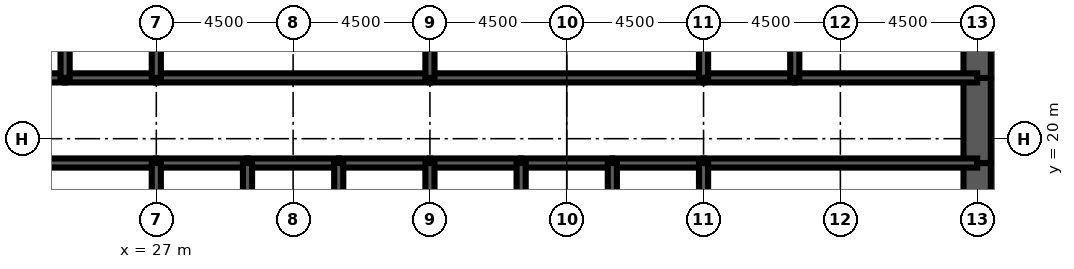
"""IFC4 building model, lengths in metres.
Left out: names, types, materials, properties, quantities, classifications, styles, units other than length and angle.
Written with IfcOpenShell. Run it as: python <this file> out.ifc"""

import sys

from ifc_helpers import new_model, si_unit, direction, frame, frame_2d, origin, place, context, subcontext, project, spatial, rectangle, extrude, element, fill, save


model = new_model("IFC4")
c1 = context("Model", 3, precision=1e-05, world=origin(), true_north=direction((0.0, 1.0)))
c2 = subcontext(c1, "Body", "Model", "MODEL_VIEW")
j1 = project(units=[si_unit("LENGTHUNIT", "METRE"), si_unit("PLANEANGLEUNIT", "RADIAN")], contexts=[c1])
p1 = place(None, origin())
s1 = spatial("IfcSite", under=j1, at=p1, CompositionType="ELEMENT")
p2 = place(p1, origin())
s2 = spatial("IfcBuilding", under=s1, at=p2, CompositionType="ELEMENT")
p3 = place(p2, frame((0.0, 0.0, 167.7)))
s3 = spatial("IfcBuildingStorey", under=s2, at=p3, CompositionType="ELEMENT", Elevation=167.7)
p4 = place(p3, frame((54.0, 16.0, 0.0), z_axis=(0.0, 0.0, 1.0), x_axis=(0.0, 1.0, 0.0)))
e1 = element("IfcWall", 1, at=p4, inside=s3, PredefinedType="SHEAR", context=c2, shape_type="SweptSolid", body=[
    extrude(rectangle(XDim=3.2, YDim=0.9, at=frame_2d((1.6, 0.0))), origin(), (0.0, 0.0, 1.0), 4.2),
])
p5 = place(p3, frame((54.0, 19.2, 0.0), z_axis=(0.0, 0.0, 1.0), x_axis=(0.0, 1.0, 0.0)))
e2 = element("IfcWall", 2, at=p5, inside=s3, PredefinedType="SHEAR", context=c2, shape_type="SweptSolid", body=[
    extrude(rectangle(XDim=2.8, YDim=0.9, at=frame_2d((1.4, 0.0))), origin(), (0.0, 0.0, 1.0), 4.2),
])
p6 = place(p5, frame((0.4, 0.0, 0.0)))
e3 = element("IfcOpeningElement", 3, at=p6, cuts=e2, PredefinedType="OPENING", context=c2, shape_type="SweptSolid", body=[
    extrude(rectangle(XDim=1.8, YDim=2.1, at=frame_2d((0.9, 1.05))), frame((0.0, 0.46, 0.0), z_axis=(0.0, -1.0, 0.0), x_axis=(1.0, 0.0, 0.0)), (0.0, 0.0, 1.0), 0.92),
])
p7 = place(p3, frame((54.0, 22.0, 0.0), z_axis=(0.0, 0.0, 1.0), x_axis=(0.0, 1.0, 0.0)))
e4 = element("IfcWall", 4, at=p7, inside=s3, PredefinedType="SHEAR", context=c2, shape_type="SweptSolid", body=[
    extrude(rectangle(XDim=4.0, YDim=0.9, at=frame_2d((2.0, 0.0))), origin(), (0.0, 0.0, 1.0), 4.2),
])
p8 = place(p3, frame((18.0, 19.2, 0.0), z_axis=(0.0, 0.0, 1.0), x_axis=(1.0, 0.0, 0.0)))
e5 = element("IfcWall", 5, at=p8, inside=s3, PredefinedType="SOLIDWALL", context=c2, shape_type="SweptSolid", body=[
    extrude(rectangle(XDim=9.0, YDim=0.3, at=frame_2d((4.5, 0.0))), origin(), (0.0, 0.0, 1.0), 4.2),
])
p9 = place(p8, frame((0.65, 0.0, 0.0)))
e6 = element("IfcOpeningElement", 6, at=p9, cuts=e5, PredefinedType="OPENING", context=c2, shape_type="SweptSolid", body=[
    extrude(rectangle(XDim=1.0, YDim=2.1, at=frame_2d((0.5, 1.05))), frame((0.0, 0.16, 0.0), z_axis=(0.0, -1.0, 0.0), x_axis=(1.0, 0.0, 0.0)), (0.0, 0.0, 1.0), 0.32),
])
p10 = place(p3, frame((27.0, 19.2, 0.0), z_axis=(0.0, 0.0, 1.0), x_axis=(1.0, 0.0, 0.0)))
e7 = element("IfcWall", 7, at=p10, inside=s3, PredefinedType="SOLIDWALL", context=c2, shape_type="SweptSolid", body=[
    extrude(rectangle(XDim=3.0, YDim=0.3, at=frame_2d((1.5, 0.0))), origin(), (0.0, 0.0, 1.0), 4.2),
])
p11 = place(p10, frame((0.95, 0.0, 0.0)))
e8 = element("IfcOpeningElement", 8, at=p11, cuts=e7, PredefinedType="OPENING", context=c2, shape_type="SweptSolid", body=[
    extrude(rectangle(XDim=1.1, YDim=2.2, at=frame_2d((0.55, 1.1))), frame((0.0, 0.16, 0.0), z_axis=(0.0, -1.0, 0.0), x_axis=(1.0, 0.0, 0.0)), (0.0, 0.0, 1.0), 0.32),
])
p12 = place(p3, frame((30.0, 19.2, 0.0), z_axis=(0.0, 0.0, 1.0), x_axis=(1.0, 0.0, 0.0)))
e9 = element("IfcWall", 9, at=p12, inside=s3, PredefinedType="SOLIDWALL", context=c2, shape_type="SweptSolid", body=[
    extrude(rectangle(XDim=3.0, YDim=0.3, at=frame_2d((1.5, 0.0))), origin(), (0.0, 0.0, 1.0), 4.2),
])
p13 = place(p12, frame((0.95, 0.0, 0.0)))
e10 = element("IfcOpeningElement", 10, at=p13, cuts=e9, PredefinedType="OPENING", context=c2, shape_type="SweptSolid", body=[
    extrude(rectangle(XDim=1.1, YDim=2.2, at=frame_2d((0.55, 1.1))), frame((0.0, 0.16, 0.0), z_axis=(0.0, -1.0, 0.0), x_axis=(1.0, 0.0, 0.0)), (0.0, 0.0, 1.0), 0.32),
])
p14 = place(p3, frame((33.0, 19.2, 0.0), z_axis=(0.0, 0.0, 1.0), x_axis=(1.0, 0.0, 0.0)))
e11 = element("IfcWall", 11, at=p14, inside=s3, PredefinedType="SOLIDWALL", context=c2, shape_type="SweptSolid", body=[
    extrude(rectangle(XDim=3.0, YDim=0.3, at=frame_2d((1.5, 0.0))), origin(), (0.0, 0.0, 1.0), 4.2),
])
p15 = place(p14, frame((0.95, 0.0, 0.0)))
e12 = element("IfcOpeningElement", 12, at=p15, cuts=e11, PredefinedType="OPENING", context=c2, shape_type="SweptSolid", body=[
    extrude(rectangle(XDim=1.1, YDim=2.2, at=frame_2d((0.55, 1.1))), frame((0.0, 0.16, 0.0), z_axis=(0.0, -1.0, 0.0), x_axis=(1.0, 0.0, 0.0)), (0.0, 0.0, 1.0), 0.32),
])
p16 = place(p3, frame((36.0, 19.2, 0.0), z_axis=(0.0, 0.0, 1.0), x_axis=(1.0, 0.0, 0.0)))
e13 = element("IfcWall", 13, at=p16, inside=s3, PredefinedType="SOLIDWALL", context=c2, shape_type="SweptSolid", body=[
    extrude(rectangle(XDim=3.0, YDim=0.3, at=frame_2d((1.5, 0.0))), origin(), (0.0, 0.0, 1.0), 4.2),
])
p17 = place(p16, frame((0.95, 0.0, 0.0)))
e14 = element("IfcOpeningElement", 14, at=p17, cuts=e13, PredefinedType="OPENING", context=c2, shape_type="SweptSolid", body=[
    extrude(rectangle(XDim=1.1, YDim=2.2, at=frame_2d((0.55, 1.1))), frame((0.0, 0.16, 0.0), z_axis=(0.0, -1.0, 0.0), x_axis=(1.0, 0.0, 0.0)), (0.0, 0.0, 1.0), 0.32),
])
p18 = place(p3, frame((39.0, 19.2, 0.0), z_axis=(0.0, 0.0, 1.0), x_axis=(1.0, 0.0, 0.0)))
e15 = element("IfcWall", 15, at=p18, inside=s3, PredefinedType="SOLIDWALL", context=c2, shape_type="SweptSolid", body=[
    extrude(rectangle(XDim=3.0, YDim=0.3, at=frame_2d((1.5, 0.0))), origin(), (0.0, 0.0, 1.0), 4.2),
])
p19 = place(p18, frame((1.0, 0.0, 0.0)))
e16 = element("IfcOpeningElement", 16, at=p19, cuts=e15, PredefinedType="OPENING", context=c2, shape_type="SweptSolid", body=[
    extrude(rectangle(XDim=1.0, YDim=2.1, at=frame_2d((0.5, 1.05))), frame((0.0, 0.16, 0.0), z_axis=(0.0, -1.0, 0.0), x_axis=(1.0, 0.0, 0.0)), (0.0, 0.0, 1.0), 0.32),
])
p20 = place(p3, frame((42.0, 19.2, 0.0), z_axis=(0.0, 0.0, 1.0), x_axis=(1.0, 0.0, 0.0)))
e17 = element("IfcWall", 17, at=p20, inside=s3, PredefinedType="SOLIDWALL", context=c2, shape_type="SweptSolid", body=[
    extrude(rectangle(XDim=3.0, YDim=0.3, at=frame_2d((1.5, 0.0))), origin(), (0.0, 0.0, 1.0), 4.2),
])
p21 = place(p3, frame((45.0, 19.2, 0.0), z_axis=(0.0, 0.0, 1.0), x_axis=(1.0, 0.0, 0.0)))
e18 = element("IfcWall", 18, at=p21, inside=s3, PredefinedType="SOLIDWALL", context=c2, shape_type="SweptSolid", body=[
    extrude(rectangle(XDim=9.0, YDim=0.3, at=frame_2d((4.5, 0.0))), origin(), (0.0, 0.0, 1.0), 4.2),
])
p22 = place(p21, frame((7.35, 0.0, 0.0)))
e19 = element("IfcOpeningElement", 19, at=p22, cuts=e18, PredefinedType="OPENING", context=c2, shape_type="SweptSolid", body=[
    extrude(rectangle(XDim=1.0, YDim=2.1, at=frame_2d((0.5, 1.05))), frame((0.0, 0.16, 0.0), z_axis=(0.0, -1.0, 0.0), x_axis=(1.0, 0.0, 0.0)), (0.0, 0.0, 1.0), 0.32),
])
p23 = place(p3, frame((18.0, 22.0, 0.0), z_axis=(0.0, 0.0, 1.0), x_axis=(1.0, 0.0, 0.0)))
e20 = element("IfcWall", 20, at=p23, inside=s3, PredefinedType="SOLIDWALL", context=c2, shape_type="SweptSolid", body=[
    extrude(rectangle(XDim=6.0, YDim=0.3, at=frame_2d((3.0, 0.0))), origin(), (0.0, 0.0, 1.0), 4.2),
])
p24 = place(p23, frame((4.4, 0.0, 0.0)))
e21 = element("IfcOpeningElement", 21, at=p24, cuts=e20, PredefinedType="OPENING", context=c2, shape_type="SweptSolid", body=[
    extrude(rectangle(XDim=1.0, YDim=2.1, at=frame_2d((0.5, 1.05))), frame((0.0, 0.16, 0.0), z_axis=(0.0, -1.0, 0.0), x_axis=(1.0, 0.0, 0.0)), (0.0, 0.0, 1.0), 0.32),
])
p25 = place(p23, frame((1.0, 0.0, 0.0)))
e22 = element("IfcOpeningElement", 22, at=p25, cuts=e20, PredefinedType="OPENING", context=c2, shape_type="SweptSolid", body=[
    extrude(rectangle(XDim=1.0, YDim=2.1, at=frame_2d((0.5, 1.05))), frame((0.0, 0.16, 0.0), z_axis=(0.0, -1.0, 0.0), x_axis=(1.0, 0.0, 0.0)), (0.0, 0.0, 1.0), 0.32),
])
p26 = place(p3, frame((24.0, 22.0, 0.0), z_axis=(0.0, 0.0, 1.0), x_axis=(1.0, 0.0, 0.0)))
e23 = element("IfcWall", 23, at=p26, inside=s3, PredefinedType="SOLIDWALL", context=c2, shape_type="SweptSolid", body=[
    extrude(rectangle(XDim=3.0, YDim=0.3, at=frame_2d((1.5, 0.0))), origin(), (0.0, 0.0, 1.0), 4.2),
])
p27 = place(p26, frame((1.0, 0.0, 0.0)))
e24 = element("IfcOpeningElement", 24, at=p27, cuts=e23, PredefinedType="OPENING", context=c2, shape_type="SweptSolid", body=[
    extrude(rectangle(XDim=1.0, YDim=2.1, at=frame_2d((0.5, 1.05))), frame((0.0, 0.16, 0.0), z_axis=(0.0, -1.0, 0.0), x_axis=(1.0, 0.0, 0.0)), (0.0, 0.0, 1.0), 0.32),
])
p28 = place(p3, frame((27.0, 22.0, 0.0), z_axis=(0.0, 0.0, 1.0), x_axis=(1.0, 0.0, 0.0)))
e25 = element("IfcWall", 25, at=p28, inside=s3, PredefinedType="SOLIDWALL", context=c2, shape_type="SweptSolid", body=[
    extrude(rectangle(XDim=9.0, YDim=0.3, at=frame_2d((4.5, 0.0))), origin(), (0.0, 0.0, 1.0), 4.2),
])
p29 = place(p28, frame((4.0, 0.0, 0.0)))
e26 = element("IfcOpeningElement", 26, at=p29, cuts=e25, PredefinedType="OPENING", context=c2, shape_type="SweptSolid", body=[
    extrude(rectangle(XDim=1.0, YDim=2.1, at=frame_2d((0.5, 1.05))), frame((0.0, 0.16, 0.0), z_axis=(0.0, -1.0, 0.0), x_axis=(1.0, 0.0, 0.0)), (0.0, 0.0, 1.0), 0.32),
])
p30 = place(p3, frame((36.0, 22.0, 0.0), z_axis=(0.0, 0.0, 1.0), x_axis=(1.0, 0.0, 0.0)))
e27 = element("IfcWall", 27, at=p30, inside=s3, PredefinedType="SOLIDWALL", context=c2, shape_type="SweptSolid", body=[
    extrude(rectangle(XDim=9.0, YDim=0.3, at=frame_2d((4.5, 0.0))), origin(), (0.0, 0.0, 1.0), 4.2),
])
p31 = place(p30, frame((4.0, 0.0, 0.0)))
e28 = element("IfcOpeningElement", 28, at=p31, cuts=e27, PredefinedType="OPENING", context=c2, shape_type="SweptSolid", body=[
    extrude(rectangle(XDim=1.0, YDim=2.1, at=frame_2d((0.5, 1.05))), frame((0.0, 0.16, 0.0), z_axis=(0.0, -1.0, 0.0), x_axis=(1.0, 0.0, 0.0)), (0.0, 0.0, 1.0), 0.32),
])
p32 = place(p3, frame((45.0, 22.0, 0.0), z_axis=(0.0, 0.0, 1.0), x_axis=(1.0, 0.0, 0.0)))
e29 = element("IfcWall", 29, at=p32, inside=s3, PredefinedType="SOLIDWALL", context=c2, shape_type="SweptSolid", body=[
    extrude(rectangle(XDim=3.0, YDim=0.3, at=frame_2d((1.5, 0.0))), origin(), (0.0, 0.0, 1.0), 4.2),
])
p33 = place(p32, frame((1.0, 0.0, 0.0)))
e30 = element("IfcOpeningElement", 30, at=p33, cuts=e29, PredefinedType="OPENING", context=c2, shape_type="SweptSolid", body=[
    extrude(rectangle(XDim=1.0, YDim=2.1, at=frame_2d((0.5, 1.05))), frame((0.0, 0.16, 0.0), z_axis=(0.0, -1.0, 0.0), x_axis=(1.0, 0.0, 0.0)), (0.0, 0.0, 1.0), 0.32),
])
p34 = place(p3, frame((48.0, 22.0, 0.0), z_axis=(0.0, 0.0, 1.0), x_axis=(1.0, 0.0, 0.0)))
e31 = element("IfcWall", 31, at=p34, inside=s3, PredefinedType="SOLIDWALL", context=c2, shape_type="SweptSolid", body=[
    extrude(rectangle(XDim=6.0, YDim=0.3, at=frame_2d((3.0, 0.0))), origin(), (0.0, 0.0, 1.0), 4.2),
])
p35 = place(p34, frame((2.0, 0.0, 0.0)))
e32 = element("IfcOpeningElement", 32, at=p35, cuts=e31, PredefinedType="OPENING", context=c2, shape_type="SweptSolid", body=[
    extrude(rectangle(XDim=1.0, YDim=2.1, at=frame_2d((0.5, 1.05))), frame((0.0, 0.16, 0.0), z_axis=(0.0, -1.0, 0.0), x_axis=(1.0, 0.0, 0.0)), (0.0, 0.0, 1.0), 0.32),
])
p36 = place(p34, frame((4.3, 0.0, 0.0)))
e33 = element("IfcOpeningElement", 33, at=p36, cuts=e31, PredefinedType="OPENING", context=c2, shape_type="SweptSolid", body=[
    extrude(rectangle(XDim=1.0, YDim=2.1, at=frame_2d((0.5, 1.05))), frame((0.0, 0.16, 0.0), z_axis=(0.0, -1.0, 0.0), x_axis=(1.0, 0.0, 0.0)), (0.0, 0.0, 1.0), 0.32),
])
for number, where, z_axis, x_axis in (
    (34, (27.0, 16.0, 0.0), (0.0, 0.0, 1.0), (0.0, 1.0, 0.0)),
    (35, (30.0, 16.0, 0.0), (0.0, 0.0, 1.0), (0.0, 1.0, 0.0)),
    (36, (33.0, 16.0, 0.0), (0.0, 0.0, 1.0), (0.0, 1.0, 0.0)),
    (37, (36.0, 16.0, 0.0), (0.0, 0.0, 1.0), (0.0, 1.0, 0.0)),
    (38, (39.0, 16.0, 0.0), (0.0, 0.0, 1.0), (0.0, 1.0, 0.0)),
    (39, (42.0, 16.0, 0.0), (0.0, 0.0, 1.0), (0.0, 1.0, 0.0)),
    (40, (45.0, 16.0, 0.0), (0.0, 0.0, 1.0), (0.0, 1.0, 0.0)),
):
    element("IfcWall", number, at=place(p3, frame(where, z_axis=z_axis, x_axis=x_axis)), inside=s3, PredefinedType="SOLIDWALL", context=c2, shape_type="SweptSolid", body=[
        extrude(rectangle(XDim=3.2, YDim=0.3, at=frame_2d((1.6, 0.0))), origin(), (0.0, 0.0, 1.0), 4.2),
    ])
for number, where, z_axis, x_axis in (
    (41, (24.0, 22.0, 0.0), (0.0, 0.0, 1.0), (0.0, 1.0, 0.0)),
    (42, (27.0, 22.0, 0.0), (0.0, 0.0, 1.0), (0.0, 1.0, 0.0)),
    (43, (36.0, 22.0, 0.0), (0.0, 0.0, 1.0), (0.0, 1.0, 0.0)),
    (44, (45.0, 22.0, 0.0), (0.0, 0.0, 1.0), (0.0, 1.0, 0.0)),
    (45, (48.0, 22.0, 0.0), (0.0, 0.0, 1.0), (0.0, 1.0, 0.0)),
):
    element("IfcWall", number, at=place(p3, frame(where, z_axis=z_axis, x_axis=x_axis)), inside=s3, PredefinedType="SOLIDWALL", context=c2, shape_type="SweptSolid", body=[
        extrude(rectangle(XDim=4.0, YDim=0.3, at=frame_2d((2.0, 0.0))), origin(), (0.0, 0.0, 1.0), 4.2),
    ])
p37 = place(p3, frame((38.5, 22.15, 0.0), z_axis=(0.0, 0.0, 1.0), x_axis=(0.0, 1.0, 0.0)))
e46 = element("IfcWall", 46, at=p37, inside=s3, PredefinedType="PARTITIONING", context=c2, shape_type="SweptSolid", body=[
    extrude(rectangle(XDim=3.7, YDim=0.15, at=frame_2d((1.85, 0.0))), origin(), (0.0, 0.0, 1.0), 3.0),
])
p38 = place(p37, frame((2.2, 0.0, 0.0)))
e47 = element("IfcOpeningElement", 47, at=p38, cuts=e46, PredefinedType="OPENING", context=c2, shape_type="SweptSolid", body=[
    extrude(rectangle(XDim=1.0, YDim=2.1, at=frame_2d((0.5, 1.05))), frame((0.0, 0.085, 0.0), z_axis=(0.0, -1.0, 0.0), x_axis=(1.0, 0.0, 0.0)), (0.0, 0.0, 1.0), 0.17),
])
p39 = place(p3, frame((51.975, 22.15, 0.0), z_axis=(0.0, 0.0, 1.0), x_axis=(0.0, 1.0, 0.0)))
e48 = element("IfcWall", 48, at=p39, inside=s3, PredefinedType="PARTITIONING", context=c2, shape_type="SweptSolid", body=[
    extrude(rectangle(XDim=3.7, YDim=0.15, at=frame_2d((1.85, 0.0))), origin(), (0.0, 0.0, 1.0), 3.0),
])
p40 = place(p3, frame((24.5, 19.35, 0.0), z_axis=(0.0, 0.0, 1.0), x_axis=(0.0, 1.0, 0.0)))
e49 = element("IfcWall", 49, at=p40, inside=s3, PredefinedType="PARTITIONING", context=c2, shape_type="SweptSolid", body=[
    extrude(rectangle(XDim=2.5, YDim=0.15, at=frame_2d((1.25, 0.0))), origin(), (0.0, 0.0, 1.0), 3.0),
])
p41 = place(p40, frame((1.15, 0.0, 0.0)))
e50 = element("IfcOpeningElement", 50, at=p41, cuts=e49, PredefinedType="OPENING", context=c2, shape_type="SweptSolid", body=[
    extrude(rectangle(XDim=1.0, YDim=2.1, at=frame_2d((0.5, 1.05))), frame((0.0, 0.085, 0.0), z_axis=(0.0, -1.0, 0.0), x_axis=(1.0, 0.0, 0.0)), (0.0, 0.0, 1.0), 0.17),
])
p42 = place(p41, origin())
e51 = element("IfcDoor", 51, at=p42, inside=s3, OperationType="SINGLE_SWING_RIGHT", PredefinedType="DOOR", context=c2, shape_type="SweptSolid", body=[
    extrude(rectangle(XDim=1.0, YDim=2.1, at=frame_2d((0.5, 1.05))), frame((0.0, 0.025, 0.0), z_axis=(0.0, -1.0, 0.0), x_axis=(1.0, 0.0, 0.0)), (0.0, 0.0, 1.0), 0.05),
])
fill(e50, e51)
p43 = place(p11, origin())
e52 = element("IfcDoor", 52, at=p43, inside=s3, OperationType="DOUBLE_DOOR_SLIDING", PredefinedType="USERDEFINED", context=c2, shape_type="SweptSolid", body=[
    extrude(rectangle(XDim=1.1, YDim=2.2, at=frame_2d((0.55, 1.1))), frame((0.0, 0.025, 0.0), z_axis=(0.0, -1.0, 0.0), x_axis=(1.0, 0.0, 0.0)), (0.0, 0.0, 1.0), 0.05),
])
fill(e8, e52)
p44 = place(p13, origin())
e53 = element("IfcDoor", 53, at=p44, inside=s3, OperationType="DOUBLE_DOOR_SLIDING", PredefinedType="USERDEFINED", context=c2, shape_type="SweptSolid", body=[
    extrude(rectangle(XDim=1.1, YDim=2.2, at=frame_2d((0.55, 1.1))), frame((0.0, 0.025, 0.0), z_axis=(0.0, -1.0, 0.0), x_axis=(1.0, 0.0, 0.0)), (0.0, 0.0, 1.0), 0.05),
])
fill(e10, e53)
p45 = place(p15, origin())
e54 = element("IfcDoor", 54, at=p45, inside=s3, OperationType="DOUBLE_DOOR_SLIDING", PredefinedType="USERDEFINED", context=c2, shape_type="SweptSolid", body=[
    extrude(rectangle(XDim=1.1, YDim=2.2, at=frame_2d((0.55, 1.1))), frame((0.0, 0.025, 0.0), z_axis=(0.0, -1.0, 0.0), x_axis=(1.0, 0.0, 0.0)), (0.0, 0.0, 1.0), 0.05),
])
fill(e12, e54)
p46 = place(p17, origin())
e55 = element("IfcDoor", 55, at=p46, inside=s3, OperationType="DOUBLE_DOOR_SLIDING", PredefinedType="USERDEFINED", context=c2, shape_type="SweptSolid", body=[
    extrude(rectangle(XDim=1.1, YDim=2.2, at=frame_2d((0.55, 1.1))), frame((0.0, 0.025, 0.0), z_axis=(0.0, -1.0, 0.0), x_axis=(1.0, 0.0, 0.0)), (0.0, 0.0, 1.0), 0.05),
])
fill(e14, e55)
p47 = place(p22, origin())
e56 = element("IfcDoor", 56, at=p47, inside=s3, OperationType="SINGLE_SWING_RIGHT", PredefinedType="DOOR", context=c2, shape_type="SweptSolid", body=[
    extrude(rectangle(XDim=1.0, YDim=2.1, at=frame_2d((0.5, 1.05))), frame((0.0, 0.025, 0.0), z_axis=(0.0, -1.0, 0.0), x_axis=(1.0, 0.0, 0.0)), (0.0, 0.0, 1.0), 0.05),
])
fill(e19, e56)
p48 = place(p6, origin())
e57 = element("IfcDoor", 57, at=p48, inside=s3, OperationType="SINGLE_SWING_LEFT", PredefinedType="DOOR", context=c2, shape_type="SweptSolid", body=[
    extrude(rectangle(XDim=1.8, YDim=2.1, at=frame_2d((0.9, 1.05))), frame((0.0, 0.45, 0.0), z_axis=(0.0, -1.0, 0.0), x_axis=(1.0, 0.0, 0.0)), (0.0, 0.0, 1.0), 0.899),
])
fill(e3, e57)
p49 = place(p27, origin())
e58 = element("IfcDoor", 58, at=p49, inside=s3, OperationType="SINGLE_SWING_LEFT", PredefinedType="DOOR", context=c2, shape_type="SweptSolid", body=[
    extrude(rectangle(XDim=1.0, YDim=2.1, at=frame_2d((0.5, 1.05))), frame((0.0, 0.025, 0.0), z_axis=(0.0, -1.0, 0.0), x_axis=(1.0, 0.0, 0.0)), (0.0, 0.0, 1.0), 0.05),
])
fill(e24, e58)
p50 = place(p29, origin())
e59 = element("IfcDoor", 59, at=p50, inside=s3, OperationType="SINGLE_SWING_LEFT", PredefinedType="DOOR", context=c2, shape_type="SweptSolid", body=[
    extrude(rectangle(XDim=1.0, YDim=2.1, at=frame_2d((0.5, 1.05))), frame((0.0, 0.025, 0.0), z_axis=(0.0, -1.0, 0.0), x_axis=(1.0, 0.0, 0.0)), (0.0, 0.0, 1.0), 0.05),
])
fill(e26, e59)
p51 = place(p31, origin())
e60 = element("IfcDoor", 60, at=p51, inside=s3, OperationType="SINGLE_SWING_LEFT", PredefinedType="DOOR", context=c2, shape_type="SweptSolid", body=[
    extrude(rectangle(XDim=1.0, YDim=2.1, at=frame_2d((0.5, 1.05))), frame((0.0, 0.025, 0.0), z_axis=(0.0, -1.0, 0.0), x_axis=(1.0, 0.0, 0.0)), (0.0, 0.0, 1.0), 0.05),
])
fill(e28, e60)
p52 = place(p33, origin())
e61 = element("IfcDoor", 61, at=p52, inside=s3, OperationType="SINGLE_SWING_LEFT", PredefinedType="DOOR", context=c2, shape_type="SweptSolid", body=[
    extrude(rectangle(XDim=1.0, YDim=2.1, at=frame_2d((0.5, 1.05))), frame((0.0, 0.025, 0.0), z_axis=(0.0, -1.0, 0.0), x_axis=(1.0, 0.0, 0.0)), (0.0, 0.0, 1.0), 0.05),
])
fill(e30, e61)
p53 = place(p35, origin())
e62 = element("IfcDoor", 62, at=p53, inside=s3, OperationType="SINGLE_SWING_LEFT", PredefinedType="DOOR", context=c2, shape_type="SweptSolid", body=[
    extrude(rectangle(XDim=1.0, YDim=2.1, at=frame_2d((0.5, 1.05))), frame((0.0, 0.025, 0.0), z_axis=(0.0, -1.0, 0.0), x_axis=(1.0, 0.0, 0.0)), (0.0, 0.0, 1.0), 0.05),
])
fill(e32, e62)
p54 = place(p36, origin())
e63 = element("IfcDoor", 63, at=p54, inside=s3, OperationType="SINGLE_SWING_RIGHT", PredefinedType="DOOR", context=c2, shape_type="SweptSolid", body=[
    extrude(rectangle(XDim=1.0, YDim=2.1, at=frame_2d((0.5, 1.05))), frame((0.0, 0.025, 0.0), z_axis=(0.0, -1.0, 0.0), x_axis=(1.0, 0.0, 0.0)), (0.0, 0.0, 1.0), 0.05),
])
fill(e33, e63)
p55 = place(p19, origin())
e64 = element("IfcDoor", 64, at=p55, inside=s3, OperationType="SINGLE_SWING_LEFT", PredefinedType="DOOR", context=c2, shape_type="SweptSolid", body=[
    extrude(rectangle(XDim=1.0, YDim=2.1, at=frame_2d((0.5, 1.05))), frame((0.0, 0.025, 0.0), z_axis=(0.0, -1.0, 0.0), x_axis=(1.0, 0.0, 0.0)), (0.0, 0.0, 1.0), 0.05),
])
fill(e16, e64)
save(model, sys.argv[1])
